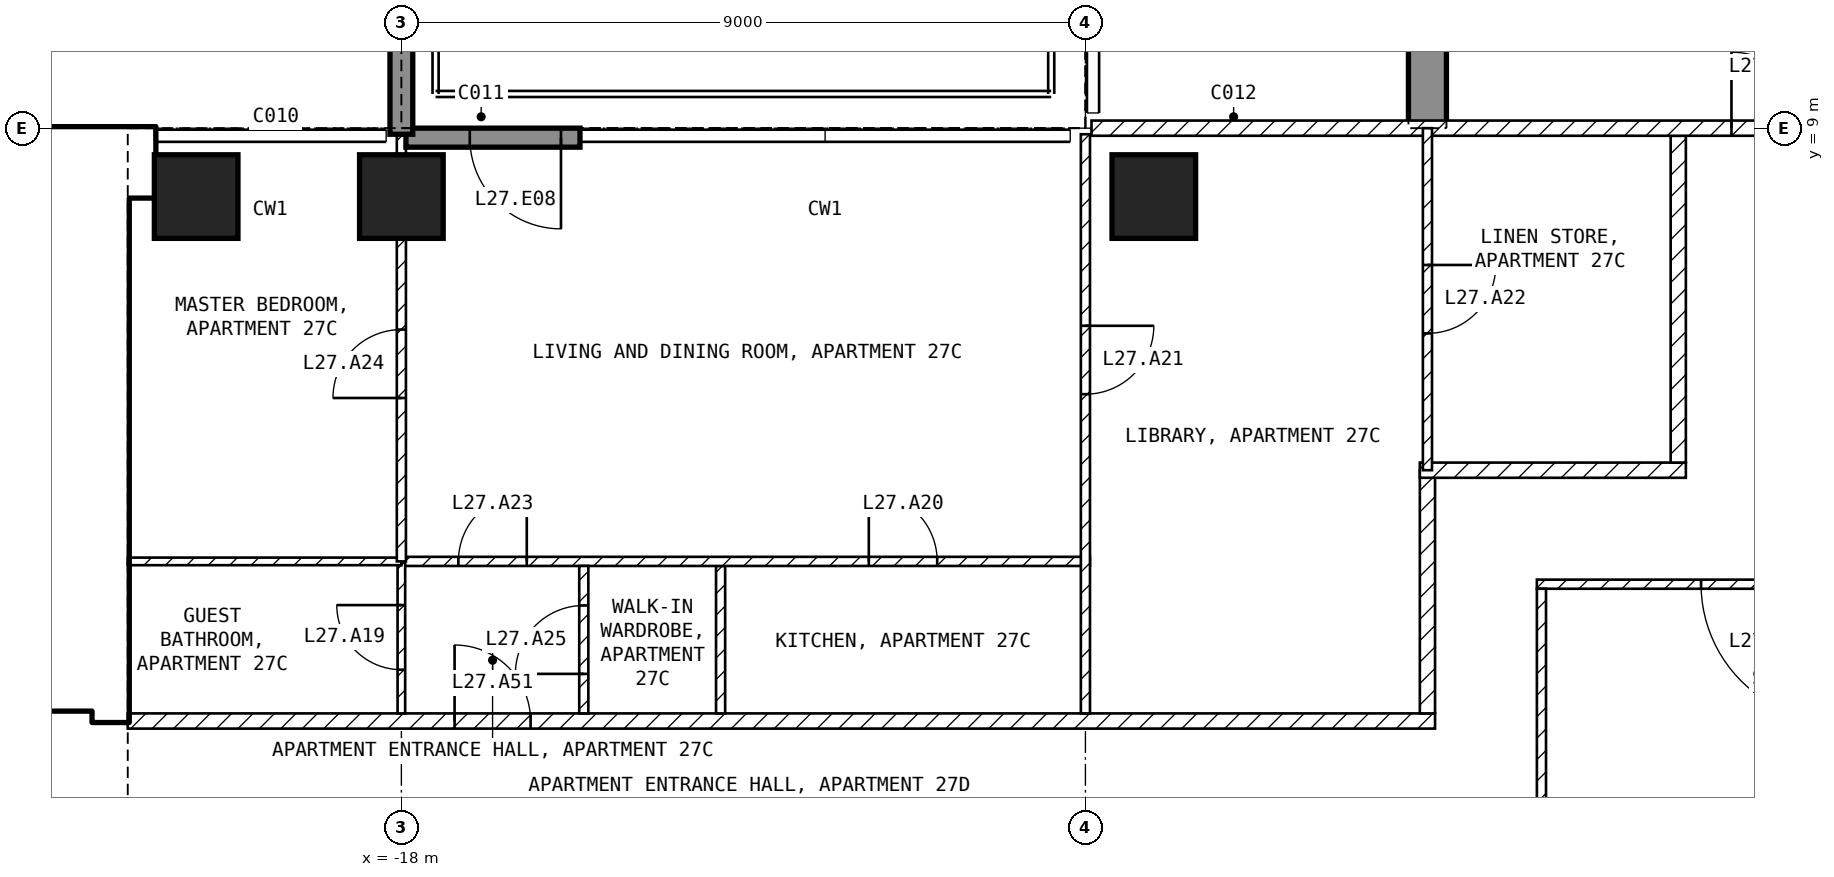
"""IFC4 building model, lengths in metres.
Left out: names, types, materials, properties, quantities, classifications, styles, units other than length and angle.
Written with IfcOpenShell. Run it as: python <this file> out.ifc"""

import sys

from ifc_helpers import new_model, si_unit, direction, frame, frame_2d, origin, origin_2d, place, context, subcontext, project, spatial, polyline, rectangle, outline, extrude, element, fill, save


model = new_model("IFC4")
c1 = context("Model", 3, precision=1e-05, world=origin(), true_north=direction((0.0, 1.0)))
c2 = subcontext(c1, "Body", "Model", "MODEL_VIEW")
j1 = project(units=[si_unit("LENGTHUNIT", "METRE"), si_unit("PLANEANGLEUNIT", "RADIAN")], contexts=[c1])
p1 = place(None, origin())
s1 = spatial("IfcSite", under=j1, at=p1, CompositionType="ELEMENT")
p2 = place(p1, origin())
s2 = spatial("IfcBuilding", under=s1, at=p2, CompositionType="ELEMENT")
p3 = place(p2, frame((0.0, 0.0, 116.4)))
s3 = spatial("IfcBuildingStorey", under=s2, at=p3, CompositionType="ELEMENT", Elevation=116.4)
for number, where, z_axis, x_axis in (
    (1, (-20.7, 8.1, -0.25), (0.0, 0.0, 1.0), (1.0, 0.0, 0.0)),
    (2, (-18.0, 8.1, -0.25), (0.0, 0.0, 1.0), (1.0, 0.0, 0.0)),
    (3, (-8.1, 8.1, -0.25), (0.0, 0.0, 1.0), (1.0, 0.0, 0.0)),
):
    element("IfcColumn", number, at=place(p3, frame(where, z_axis=z_axis, x_axis=x_axis)), inside=s3, PredefinedType="COLUMN", context=c2, shape_type="SweptSolid", body=[
        extrude(rectangle(XDim=1.1, YDim=1.1, at=origin_2d()), origin(), (0.0, 0.0, 1.0), 3.5),
    ])
p4 = place(p3, frame((-4.75, 9.0, -0.25), z_axis=(1.0, 0.0, 0.0), x_axis=(0.0, 1.0, 0.0)))
e4 = element("IfcWall", 4, at=p4, inside=s3, PredefinedType="SHEAR", context=c2, shape_type="SweptSolid", body=[
    extrude(outline(polyline([(0.0, 0.0), (2.1, 0.0), (2.1, 2.65), (4.5, 2.65), (4.5, 0.0), (9.9, 0.0), (9.9, 2.65), (12.3, 2.65), (12.3, 0.0), (16.55, 0.0), (16.55, 3.5), (0.0, 3.5), (0.0, 0.0)])), origin(), (0.0, 0.0, 1.0), 0.5),
])
p5 = place(p3, frame((-15.65, 8.875, 0.0), z_axis=(0.0, 0.0, 1.0), x_axis=(-1.0, 0.0, 0.0)))
e5 = element("IfcWall", 5, at=p5, inside=s3, PredefinedType="SOLIDWALL", context=c2, shape_type="SweptSolid", body=[
    extrude(rectangle(XDim=2.29, YDim=0.25, at=frame_2d((1.145, 0.0))), origin(), (0.0, 0.0, 1.0), 3.25),
])
p6 = place(p5, frame((0.25, 0.0, 0.0)))
e6 = element("IfcOpeningElement", 6, at=p6, cuts=e5, PredefinedType="OPENING", context=c2, shape_type="SweptSolid", body=[
    extrude(rectangle(XDim=1.2, YDim=2.4, at=frame_2d((0.6, 1.2))), frame((0.0, 0.135, 0.0), z_axis=(0.0, -1.0, 0.0), x_axis=(1.0, 0.0, 0.0)), (0.0, 0.0, 1.0), 0.27),
])
p7 = place(p3, frame((-18.0, 8.92, 0.0), z_axis=(0.0, 0.0, 1.0), x_axis=(0.0, 1.0, 0.0)))
e7 = element("IfcWall", 7, at=p7, inside=s3, PredefinedType="SOLIDWALL", context=c2, shape_type="SweptSolid", body=[
    extrude(rectangle(XDim=2.82, YDim=0.3, at=frame_2d((1.41, 0.0))), origin(), (0.0, 0.0, 1.0), 3.25),
])
p8 = place(p3, frame((-29.45, 8.55, 0.0), z_axis=(0.0, 0.0, 1.0), x_axis=(1.0, 0.0, 0.0)))
e8 = element("IfcWall", 8, at=p8, inside=s3, PredefinedType="SHEAR", context=c2, shape_type="SweptSolid", body=[
    extrude(rectangle(XDim=8.2, YDim=0.9, at=frame_2d((4.1, 0.0))), origin(), (0.0, 0.0, 1.0), 3.25),
])
p9 = place(p3, frame((-21.825, 1.2, 0.0), z_axis=(0.0, 0.0, 1.0), x_axis=(0.0, 1.0, 0.0)))
e9 = element("IfcWall", 9, at=p9, inside=s3, PredefinedType="SHEAR", context=c2, shape_type="SweptSolid", body=[
    extrude(rectangle(XDim=6.9, YDim=0.45, at=frame_2d((3.45, 0.0))), origin(), (0.0, 0.0, 1.0), 3.25),
])
p10 = place(p3, frame((-33.05, 1.45, 0.0), z_axis=(0.0, 0.0, 1.0), x_axis=(1.0, 0.0, 0.0)))
e10 = element("IfcWall", 10, at=p10, inside=s3, PredefinedType="SOLIDWALL", context=c2, shape_type="SweptSolid", body=[
    extrude(rectangle(XDim=11.0, YDim=0.2, at=frame_2d((5.5, 0.0))), origin(), (0.0, 0.0, 1.0), 3.25),
])
p11 = place(p10, frame((9.25, 0.0, 0.0)))
e11 = element("IfcOpeningElement", 11, at=p11, cuts=e10, PredefinedType="OPENING", context=c2, shape_type="SweptSolid", body=[
    extrude(rectangle(XDim=1.0, YDim=2.1, at=frame_2d((0.5, 1.05))), frame((0.0, 0.11, 0.0), z_axis=(0.0, -1.0, 0.0), x_axis=(1.0, 0.0, 0.0)), (0.0, 0.0, 1.0), 0.22),
])
p12 = place(p10, frame((6.75, 0.0, 0.0)))
e12 = element("IfcOpeningElement", 12, at=p12, cuts=e10, PredefinedType="OPENING", context=c2, shape_type="SweptSolid", body=[
    extrude(rectangle(XDim=1.0, YDim=2.1, at=frame_2d((0.5, 1.05))), frame((0.0, 0.11, 0.0), z_axis=(0.0, -1.0, 0.0), x_axis=(1.0, 0.0, 0.0)), (0.0, 0.0, 1.0), 0.22),
])
p13 = place(p10, frame((1.025, 0.0, 0.0)))
e13 = element("IfcOpeningElement", 13, at=p13, cuts=e10, PredefinedType="OPENING", context=c2, shape_type="SweptSolid", body=[
    extrude(rectangle(XDim=0.9, YDim=2.1, at=frame_2d((0.45, 1.05))), frame((0.0, 0.11, 0.0), z_axis=(0.0, -1.0, 0.0), x_axis=(1.0, 0.0, 0.0)), (0.0, 0.0, 1.0), 0.22),
])
p14 = place(p3, frame((-28.35, 5.15, 0.0), z_axis=(0.0, 0.0, 1.0), x_axis=(1.0, 0.0, 0.0)))
e14 = element("IfcWall", 14, at=p14, inside=s3, PredefinedType="SOLIDWALL", context=c2, shape_type="SweptSolid", body=[
    extrude(rectangle(XDim=6.3, YDim=0.2, at=frame_2d((3.15, 0.0))), origin(), (0.0, 0.0, 1.0), 3.25),
])
p15 = place(p14, frame((5.1, 0.0, 0.0)))
e15 = element("IfcOpeningElement", 15, at=p15, cuts=e14, PredefinedType="OPENING", context=c2, shape_type="SweptSolid", body=[
    extrude(rectangle(XDim=1.0, YDim=2.1, at=frame_2d((0.5, 1.05))), frame((0.0, 0.11, 0.0), z_axis=(0.0, -1.0, 0.0), x_axis=(1.0, 0.0, 0.0)), (0.0, 0.0, 1.0), 0.22),
])
p16 = place(p3, frame((3.06, 3.0, 0.0), z_axis=(0.0, 0.0, 1.0), x_axis=(-1.0, 0.0, 0.0)))
e16 = element("IfcWall", 16, at=p16, inside=s3, PredefinedType="PARTITIONING", context=c2, shape_type="SweptSolid", body=[
    extrude(rectangle(XDim=6.12, YDim=0.12, at=frame_2d((3.06, 0.0))), origin(), (0.0, 0.0, 1.0), 3.25),
])
p17 = place(p16, frame((2.16, 0.0, 0.0)))
e17 = element("IfcOpeningElement", 17, at=p17, cuts=e16, PredefinedType="OPENING", context=c2, shape_type="SweptSolid", body=[
    extrude(rectangle(XDim=1.8, YDim=2.1, at=frame_2d((0.9, 1.05))), frame((0.0, 0.07, 0.0), z_axis=(0.0, -1.0, 0.0), x_axis=(1.0, 0.0, 0.0)), (0.0, 0.0, 1.0), 0.14),
])
p18 = place(p3, frame((-3.0, 2.94, 0.0), z_axis=(0.0, 0.0, 1.0), x_axis=(0.0, -1.0, 0.0)))
e18 = element("IfcWall", 18, at=p18, inside=s3, PredefinedType="PARTITIONING", context=c2, shape_type="SweptSolid", body=[
    extrude(rectangle(XDim=5.88, YDim=0.12, at=frame_2d((2.94, 0.0))), origin(), (0.0, 0.0, 1.0), 3.25),
])
p19 = place(p3, frame((-21.6, 1.2, 0.0), z_axis=(0.0, 0.0, 1.0), x_axis=(1.0, 0.0, 0.0)))
e19 = element("IfcWall", 19, at=p19, inside=s3, PredefinedType="PARTITIONING", context=c2, shape_type="SweptSolid", body=[
    extrude(rectangle(XDim=17.2, YDim=0.2, at=frame_2d((8.6, 0.0))), origin(), (0.0, 0.0, 1.0), 3.25),
])
p20 = place(p19, frame((4.3, 0.0, 0.0)))
e20 = element("IfcOpeningElement", 20, at=p20, cuts=e19, PredefinedType="OPENING", context=c2, shape_type="SweptSolid", body=[
    extrude(rectangle(XDim=1.0, YDim=2.1, at=frame_2d((0.5, 1.05))), frame((0.0, 0.11, 0.0), z_axis=(0.0, -1.0, 0.0), x_axis=(1.0, 0.0, 0.0)), (0.0, 0.0, 1.0), 0.22),
])
p21 = place(p3, frame((-4.5, 1.3, 0.0), z_axis=(0.0, 0.0, 1.0), x_axis=(0.0, 1.0, 0.0)))
e21 = element("IfcWall", 21, at=p21, inside=s3, PredefinedType="PARTITIONING", context=c2, shape_type="SweptSolid", body=[
    extrude(rectangle(XDim=3.2, YDim=0.2, at=frame_2d((1.6, 0.0))), origin(), (0.0, 0.0, 1.0), 3.25),
])
p22 = place(p3, frame((-4.6, 4.5, 0.0), z_axis=(0.0, 0.0, 1.0), x_axis=(1.0, 0.0, 0.0)))
e22 = element("IfcWall", 22, at=p22, inside=s3, PredefinedType="PARTITIONING", context=c2, shape_type="SweptSolid", body=[
    extrude(rectangle(XDim=3.5, YDim=0.2, at=frame_2d((1.75, 0.0))), origin(), (0.0, 0.0, 1.0), 3.25),
])
p23 = place(p3, frame((-1.2, 4.6, 0.0), z_axis=(0.0, 0.0, 1.0), x_axis=(0.0, 1.0, 0.0)))
e23 = element("IfcWall", 23, at=p23, inside=s3, PredefinedType="PARTITIONING", context=c2, shape_type="SweptSolid", body=[
    extrude(rectangle(XDim=4.3, YDim=0.2, at=frame_2d((2.15, 0.0))), origin(), (0.0, 0.0, 1.0), 3.25),
])
p24 = place(p3, frame((-8.92, 9.0, 0.0), z_axis=(0.0, 0.0, 1.0), x_axis=(1.0, 0.0, 0.0)))
e24 = element("IfcWall", 24, at=p24, inside=s3, PredefinedType="PARTITIONING", context=c2, shape_type="SweptSolid", body=[
    extrude(rectangle(XDim=17.84, YDim=0.2, at=frame_2d((8.92, 0.0))), origin(), (0.0, 0.0, 1.0), 3.25),
])
p25 = place(p24, frame((8.42, 0.0, 0.0)))
e25 = element("IfcOpeningElement", 25, at=p25, cuts=e24, PredefinedType="OPENING", context=c2, shape_type="SweptSolid", body=[
    extrude(rectangle(XDim=1.0, YDim=2.1, at=frame_2d((0.5, 1.05))), frame((0.0, 0.11, 0.0), z_axis=(0.0, -1.0, 0.0), x_axis=(1.0, 0.0, 0.0)), (0.0, 0.0, 1.0), 0.22),
])
p26 = place(p3, frame((-13.8, 1.3, 0.0), z_axis=(0.0, 0.0, 1.0), x_axis=(0.0, 1.0, 0.0)))
e26 = element("IfcWall", 26, at=p26, inside=s3, PredefinedType="PARTITIONING", context=c2, shape_type="SweptSolid", body=[
    extrude(rectangle(XDim=1.94, YDim=0.12, at=frame_2d((0.97, 0.0))), origin(), (0.0, 0.0, 1.0), 3.25),
])
p27 = place(p3, frame((-18.0, 3.3, 0.0), z_axis=(0.0, 0.0, 1.0), x_axis=(1.0, 0.0, 0.0)))
e27 = element("IfcWall", 27, at=p27, inside=s3, PredefinedType="PARTITIONING", context=c2, shape_type="SweptSolid", body=[
    extrude(rectangle(XDim=9.06, YDim=0.12, at=frame_2d((4.53, 0.0))), origin(), (0.0, 0.0, 1.0), 3.25),
])
p28 = place(p27, frame((6.15, 0.0, 0.0)))
e28 = element("IfcOpeningElement", 28, at=p28, cuts=e27, PredefinedType="OPENING", context=c2, shape_type="SweptSolid", body=[
    extrude(rectangle(XDim=0.9, YDim=2.1, at=frame_2d((0.45, 1.05))), frame((0.0, 0.07, 0.0), z_axis=(0.0, -1.0, 0.0), x_axis=(1.0, 0.0, 0.0)), (0.0, 0.0, 1.0), 0.14),
])
p29 = place(p27, frame((0.75, 0.0, 0.0)))
e29 = element("IfcOpeningElement", 29, at=p29, cuts=e27, PredefinedType="OPENING", context=c2, shape_type="SweptSolid", body=[
    extrude(rectangle(XDim=0.9, YDim=2.1, at=frame_2d((0.45, 1.05))), frame((0.0, 0.07, 0.0), z_axis=(0.0, -1.0, 0.0), x_axis=(1.0, 0.0, 0.0)), (0.0, 0.0, 1.0), 0.14),
])
p30 = place(p3, frame((-9.0, 8.92, 0.0), z_axis=(0.0, 0.0, 1.0), x_axis=(0.0, -1.0, 0.0)))
e30 = element("IfcWall", 30, at=p30, inside=s3, PredefinedType="PARTITIONING", context=c2, shape_type="SweptSolid", body=[
    extrude(rectangle(XDim=7.62, YDim=0.12, at=frame_2d((3.81, 0.0))), origin(), (0.0, 0.0, 1.0), 3.25),
])
p31 = place(p30, frame((2.52, 0.0, 0.0)))
e31 = element("IfcOpeningElement", 31, at=p31, cuts=e30, PredefinedType="OPENING", context=c2, shape_type="SweptSolid", body=[
    extrude(rectangle(XDim=0.9, YDim=2.1, at=frame_2d((0.45, 1.05))), frame((0.0, 0.07, 0.0), z_axis=(0.0, -1.0, 0.0), x_axis=(1.0, 0.0, 0.0)), (0.0, 0.0, 1.0), 0.14),
])
p32 = place(p3, frame((-15.6, 1.3, 0.0), z_axis=(0.0, 0.0, 1.0), x_axis=(0.0, 1.0, 0.0)))
e32 = element("IfcWall", 32, at=p32, inside=s3, PredefinedType="PARTITIONING", context=c2, shape_type="SweptSolid", body=[
    extrude(rectangle(XDim=1.94, YDim=0.12, at=frame_2d((0.97, 0.0))), origin(), (0.0, 0.0, 1.0), 3.25),
])
p33 = place(p32, frame((0.52, 0.0, 0.0)))
e33 = element("IfcOpeningElement", 33, at=p33, cuts=e32, PredefinedType="OPENING", context=c2, shape_type="SweptSolid", body=[
    extrude(rectangle(XDim=0.9, YDim=2.1, at=frame_2d((0.45, 1.05))), frame((0.0, 0.07, 0.0), z_axis=(0.0, -1.0, 0.0), x_axis=(1.0, 0.0, 0.0)), (0.0, 0.0, 1.0), 0.14),
])
p34 = place(p3, frame((-18.0, 1.3, 0.0), z_axis=(0.0, 0.0, 1.0), x_axis=(0.0, 1.0, 0.0)))
e34 = element("IfcWall", 34, at=p34, inside=s3, PredefinedType="PARTITIONING", context=c2, shape_type="SweptSolid", body=[
    extrude(rectangle(XDim=2.0, YDim=0.1, at=frame_2d((1.0, 0.0))), origin(), (0.0, 0.0, 1.0), 2.414),
])
p35 = place(p34, frame((0.575, 0.0, 0.0)))
e35 = element("IfcOpeningElement", 35, at=p35, cuts=e34, PredefinedType="OPENING", context=c2, shape_type="SweptSolid", body=[
    extrude(rectangle(XDim=0.85, YDim=2.1, at=frame_2d((0.425, 1.05))), frame((0.0, 0.06, 0.0), z_axis=(0.0, -1.0, 0.0), x_axis=(1.0, 0.0, 0.0)), (0.0, 0.0, 1.0), 0.12),
])
p36 = place(p3, frame((-21.6, 3.3, 0.0), z_axis=(0.0, 0.0, 1.0), x_axis=(1.0, 0.0, 0.0)))
e36 = element("IfcWall", 36, at=p36, inside=s3, PredefinedType="PARTITIONING", context=c2, shape_type="SweptSolid", body=[
    extrude(rectangle(XDim=3.6, YDim=0.1, at=frame_2d((1.8, 0.0))), origin(), (0.0, 0.0, 1.0), 3.25),
])
p37 = place(p3, frame((-18.0, 3.3, 0.0), z_axis=(0.0, 0.0, 1.0), x_axis=(0.0, 1.0, 0.0)))
e37 = element("IfcWall", 37, at=p37, inside=s3, PredefinedType="PARTITIONING", context=c2, shape_type="SweptSolid", body=[
    extrude(rectangle(XDim=5.62, YDim=0.12, at=frame_2d((2.81, 0.0))), origin(), (0.0, 0.0, 1.0), 2.414),
])
p38 = place(p37, frame((2.15, 0.0, 0.0)))
e38 = element("IfcOpeningElement", 38, at=p38, cuts=e37, PredefinedType="OPENING", context=c2, shape_type="SweptSolid", body=[
    extrude(rectangle(XDim=0.9, YDim=2.1, at=frame_2d((0.45, 1.05))), frame((0.0, 0.07, 0.0), z_axis=(0.0, -1.0, 0.0), x_axis=(1.0, 0.0, 0.0)), (0.0, 0.0, 1.0), 0.14),
])
p39 = place(p3, frame((-4.5, 9.0, 0.0), z_axis=(0.0, 0.0, 1.0), x_axis=(0.0, -1.0, 0.0)))
e39 = element("IfcWall", 39, at=p39, inside=s3, PredefinedType="PARTITIONING", context=c2, shape_type="SweptSolid", body=[
    extrude(rectangle(XDim=4.5, YDim=0.12, at=frame_2d((2.25, 0.0))), origin(), (0.0, 0.0, 1.0), 3.25),
])
p40 = place(p39, frame((1.8, 0.0, 0.0)))
e40 = element("IfcOpeningElement", 40, at=p40, cuts=e39, PredefinedType="OPENING", context=c2, shape_type="SweptSolid", body=[
    extrude(rectangle(XDim=0.9, YDim=2.1, at=frame_2d((0.45, 1.05))), frame((0.0, 0.07, 0.0), z_axis=(0.0, -1.0, 0.0), x_axis=(1.0, 0.0, 0.0)), (0.0, 0.0, 1.0), 0.14),
])
p41 = place(p6, origin())
e41 = element("IfcDoor", 41, at=p41, inside=s3, OperationType="SINGLE_SWING_LEFT", PredefinedType="DOOR", context=c2, shape_type="SweptSolid", body=[
    extrude(rectangle(XDim=1.2, YDim=2.4, at=frame_2d((0.6, 1.2))), frame((0.0, 0.025, 0.0), z_axis=(0.0, -1.0, 0.0), x_axis=(1.0, 0.0, 0.0)), (0.0, 0.0, 1.0), 0.05),
])
fill(e6, e41)
p42 = place(p15, origin())
e42 = element("IfcDoor", 42, at=p42, inside=s3, OperationType="SINGLE_SWING_LEFT", PredefinedType="DOOR", context=c2, shape_type="SweptSolid", body=[
    extrude(rectangle(XDim=1.0, YDim=2.1, at=frame_2d((0.5, 1.05))), frame((0.0, 0.025, 0.0), z_axis=(0.0, -1.0, 0.0), x_axis=(1.0, 0.0, 0.0)), (0.0, 0.0, 1.0), 0.05),
])
fill(e15, e42)
p43 = place(p17, origin())
e43 = element("IfcDoor", 43, at=p43, inside=s3, OperationType="SINGLE_SWING_LEFT", PredefinedType="DOOR", context=c2, shape_type="SweptSolid", body=[
    extrude(rectangle(XDim=1.8, YDim=2.1, at=frame_2d((0.9, 1.05))), frame((0.0, 0.025, 0.0), z_axis=(0.0, -1.0, 0.0), x_axis=(1.0, 0.0, 0.0)), (0.0, 0.0, 1.0), 0.05),
])
fill(e17, e43)
p44 = place(p35, origin())
e44 = element("IfcDoor", 44, at=p44, inside=s3, OperationType="SINGLE_SWING_RIGHT", PredefinedType="DOOR", context=c2, shape_type="SweptSolid", body=[
    extrude(rectangle(XDim=0.85, YDim=2.1, at=frame_2d((0.425, 1.05))), frame((0.0, 0.025, 0.0), z_axis=(0.0, -1.0, 0.0), x_axis=(1.0, 0.0, 0.0)), (0.0, 0.0, 1.0), 0.05),
])
fill(e35, e44)
p45 = place(p28, origin())
e45 = element("IfcDoor", 45, at=p45, inside=s3, OperationType="SINGLE_SWING_LEFT", PredefinedType="DOOR", context=c2, shape_type="SweptSolid", body=[
    extrude(rectangle(XDim=0.9, YDim=2.1, at=frame_2d((0.45, 1.05))), frame((0.0, 0.025, 0.0), z_axis=(0.0, -1.0, 0.0), x_axis=(1.0, 0.0, 0.0)), (0.0, 0.0, 1.0), 0.05),
])
fill(e28, e45)
p46 = place(p31, origin())
e46 = element("IfcDoor", 46, at=p46, inside=s3, OperationType="SINGLE_SWING_LEFT", PredefinedType="DOOR", context=c2, shape_type="SweptSolid", body=[
    extrude(rectangle(XDim=0.9, YDim=2.1, at=frame_2d((0.45, 1.05))), frame((0.0, 0.025, 0.0), z_axis=(0.0, -1.0, 0.0), x_axis=(1.0, 0.0, 0.0)), (0.0, 0.0, 1.0), 0.05),
])
fill(e31, e46)
p47 = place(p40, origin())
e47 = element("IfcDoor", 47, at=p47, inside=s3, OperationType="SINGLE_SWING_LEFT", PredefinedType="DOOR", context=c2, shape_type="SweptSolid", body=[
    extrude(rectangle(XDim=0.9, YDim=2.1, at=frame_2d((0.45, 1.05))), frame((0.0, 0.025, 0.0), z_axis=(0.0, -1.0, 0.0), x_axis=(1.0, 0.0, 0.0)), (0.0, 0.0, 1.0), 0.05),
])
fill(e40, e47)
p48 = place(p29, origin())
e48 = element("IfcDoor", 48, at=p48, inside=s3, OperationType="SINGLE_SWING_RIGHT", PredefinedType="DOOR", context=c2, shape_type="SweptSolid", body=[
    extrude(rectangle(XDim=0.9, YDim=2.1, at=frame_2d((0.45, 1.05))), frame((0.0, 0.025, 0.0), z_axis=(0.0, -1.0, 0.0), x_axis=(1.0, 0.0, 0.0)), (0.0, 0.0, 1.0), 0.05),
])
fill(e29, e48)
p49 = place(p38, origin())
e49 = element("IfcDoor", 49, at=p49, inside=s3, OperationType="SINGLE_SWING_LEFT", PredefinedType="DOOR", context=c2, shape_type="SweptSolid", body=[
    extrude(rectangle(XDim=0.9, YDim=2.1, at=frame_2d((0.45, 1.05))), frame((0.0, 0.025, 0.0), z_axis=(0.0, -1.0, 0.0), x_axis=(1.0, 0.0, 0.0)), (0.0, 0.0, 1.0), 0.05),
])
fill(e38, e49)
p50 = place(p33, origin())
e50 = element("IfcDoor", 50, at=p50, inside=s3, OperationType="SINGLE_SWING_LEFT", PredefinedType="DOOR", context=c2, shape_type="SweptSolid", body=[
    extrude(rectangle(XDim=0.9, YDim=2.1, at=frame_2d((0.45, 1.05))), frame((0.0, 0.025, 0.0), z_axis=(0.0, -1.0, 0.0), x_axis=(1.0, 0.0, 0.0)), (0.0, 0.0, 1.0), 0.05),
])
fill(e33, e50)
p51 = place(p25, origin())
e51 = element("IfcDoor", 51, at=p51, inside=s3, OperationType="SINGLE_SWING_LEFT", PredefinedType="DOOR", context=c2, shape_type="SweptSolid", body=[
    extrude(rectangle(XDim=1.0, YDim=2.1, at=frame_2d((0.5, 1.05))), frame((0.0, 0.025, 0.0), z_axis=(0.0, -1.0, 0.0), x_axis=(1.0, 0.0, 0.0)), (0.0, 0.0, 1.0), 0.05),
])
fill(e25, e51)
p52 = place(p20, origin())
e52 = element("IfcDoor", 52, at=p52, inside=s3, OperationType="SINGLE_SWING_LEFT", PredefinedType="DOOR", context=c2, shape_type="SweptSolid", body=[
    extrude(rectangle(XDim=1.0, YDim=2.1, at=frame_2d((0.5, 1.05))), frame((0.0, 0.025, 0.0), z_axis=(0.0, -1.0, 0.0), x_axis=(1.0, 0.0, 0.0)), (0.0, 0.0, 1.0), 0.05),
])
fill(e20, e52)
save(model, sys.argv[1])
